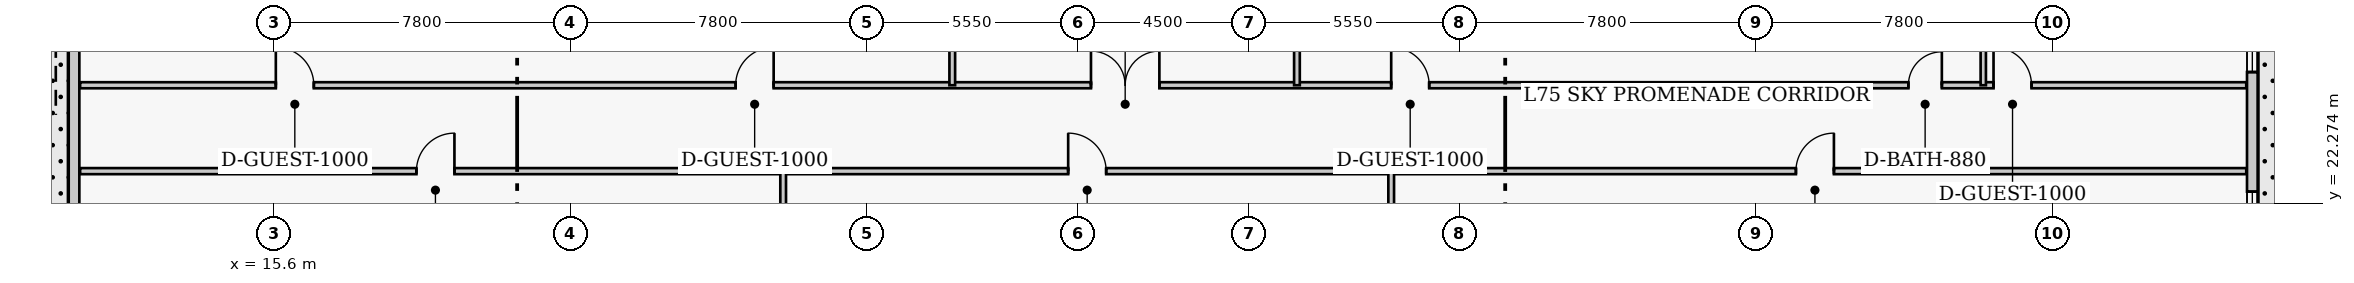
"""IFC4 building model, lengths in metres.
Left out: names, types, materials, properties, quantities, classifications, styles, units other than length and angle.
Written with IfcOpenShell. Run it as: python <this file> out.ifc"""

import sys

from ifc_helpers import new_model, si_unit, direction, frame, frame_2d, origin, place, context, subcontext, project, spatial, rectangle, extrude, element, fill, save


model = new_model("IFC4")
c1 = context("Model", 3, precision=1e-05, world=origin(), true_north=direction((0.0, 1.0)))
c2 = subcontext(c1, "Body", "Model", "MODEL_VIEW")
j1 = project(units=[si_unit("LENGTHUNIT", "METRE"), si_unit("PLANEANGLEUNIT", "RADIAN")], contexts=[c1])
p1 = place(None, origin())
s1 = spatial("IfcSite", under=j1, at=p1, CompositionType="ELEMENT")
p2 = place(p1, origin())
s2 = spatial("IfcBuilding", under=s1, at=p2, CompositionType="ELEMENT")
p3 = place(p2, frame((0.0, 0.0, 302.0)))
s3 = spatial("IfcBuildingStorey", under=s2, at=p3, CompositionType="ELEMENT", Elevation=302.0)
p4 = place(p3, frame((67.66, 15.26, 0.0), z_axis=(0.0, 0.0, 1.0), x_axis=(0.0, 1.0, 0.0)))
e1 = element("IfcWall", 1, at=p4, inside=s3, PredefinedType="SOLIDWALL", context=c2, shape_type="SweptSolid", body=[
    extrude(rectangle(XDim=26.68, YDim=0.28, at=frame_2d((13.34, 0.0))), origin(), (0.0, 0.0, 1.0), 4.31),
])
p5 = place(p4, frame((0.923, 0.0, 0.65)))
e2 = element("IfcOpeningElement", 2, at=p5, cuts=e1, PredefinedType="OPENING", context=c2, shape_type="SweptSolid", body=[
    extrude(rectangle(XDim=2.6, YDim=2.2, at=frame_2d((1.3, 1.1))), frame((0.0, 0.15, 0.0), z_axis=(0.0, -1.0, 0.0), x_axis=(1.0, 0.0, 0.0)), (0.0, 0.0, 1.0), 0.3),
])
p6 = place(p4, frame((4.72, 0.0, 0.65)))
e3 = element("IfcOpeningElement", 3, at=p6, cuts=e1, PredefinedType="OPENING", context=c2, shape_type="SweptSolid", body=[
    extrude(rectangle(XDim=2.6, YDim=2.2, at=frame_2d((1.3, 1.1))), frame((0.0, 0.15, 0.0), z_axis=(0.0, -1.0, 0.0), x_axis=(1.0, 0.0, 0.0)), (0.0, 0.0, 1.0), 0.3),
])
p7 = place(p4, frame((10.467, 0.0, 0.65)))
e4 = element("IfcOpeningElement", 4, at=p7, cuts=e1, PredefinedType="OPENING", context=c2, shape_type="SweptSolid", body=[
    extrude(rectangle(XDim=2.6, YDim=2.2, at=frame_2d((1.3, 1.1))), frame((0.0, 0.15, 0.0), z_axis=(0.0, -1.0, 0.0), x_axis=(1.0, 0.0, 0.0)), (0.0, 0.0, 1.0), 0.3),
])
p8 = place(p4, frame((14.263, 0.0, 0.65)))
e5 = element("IfcOpeningElement", 5, at=p8, cuts=e1, PredefinedType="OPENING", context=c2, shape_type="SweptSolid", body=[
    extrude(rectangle(XDim=2.6, YDim=2.2, at=frame_2d((1.3, 1.1))), frame((0.0, 0.15, 0.0), z_axis=(0.0, -1.0, 0.0), x_axis=(1.0, 0.0, 0.0)), (0.0, 0.0, 1.0), 0.3),
])
p9 = place(p4, frame((18.71, 0.0, 0.65)))
e6 = element("IfcOpeningElement", 6, at=p9, cuts=e1, PredefinedType="OPENING", context=c2, shape_type="SweptSolid", body=[
    extrude(rectangle(XDim=2.6, YDim=2.2, at=frame_2d((1.3, 1.1))), frame((0.0, 0.15, 0.0), z_axis=(0.0, -1.0, 0.0), x_axis=(1.0, 0.0, 0.0)), (0.0, 0.0, 1.0), 0.3),
])
p10 = place(p4, frame((23.157, 0.0, 0.65)))
e7 = element("IfcOpeningElement", 7, at=p10, cuts=e1, PredefinedType="OPENING", context=c2, shape_type="SweptSolid", body=[
    extrude(rectangle(XDim=2.6, YDim=2.2, at=frame_2d((1.3, 1.1))), frame((0.0, 0.15, 0.0), z_axis=(0.0, -1.0, 0.0), x_axis=(1.0, 0.0, 0.0)), (0.0, 0.0, 1.0), 0.3),
])
p11 = place(p3, frame((10.34, 38.94, 0.0), z_axis=(0.0, 0.0, 1.0), x_axis=(0.0, -1.0, 0.0)))
e8 = element("IfcWall", 8, at=p11, inside=s3, PredefinedType="SOLIDWALL", context=c2, shape_type="SweptSolid", body=[
    extrude(rectangle(XDim=26.68, YDim=0.28, at=frame_2d((13.34, 0.0))), origin(), (0.0, 0.0, 1.0), 4.31),
])
p12 = place(p11, frame((0.923, 0.0, 0.65)))
e9 = element("IfcOpeningElement", 9, at=p12, cuts=e8, PredefinedType="OPENING", context=c2, shape_type="SweptSolid", body=[
    extrude(rectangle(XDim=2.6, YDim=2.2, at=frame_2d((1.3, 1.1))), frame((0.0, 0.15, 0.0), z_axis=(0.0, -1.0, 0.0), x_axis=(1.0, 0.0, 0.0)), (0.0, 0.0, 1.0), 0.3),
])
p13 = place(p11, frame((5.37, 0.0, 0.65)))
e10 = element("IfcOpeningElement", 10, at=p13, cuts=e8, PredefinedType="OPENING", context=c2, shape_type="SweptSolid", body=[
    extrude(rectangle(XDim=2.6, YDim=2.2, at=frame_2d((1.3, 1.1))), frame((0.0, 0.15, 0.0), z_axis=(0.0, -1.0, 0.0), x_axis=(1.0, 0.0, 0.0)), (0.0, 0.0, 1.0), 0.3),
])
p14 = place(p11, frame((9.817, 0.0, 0.65)))
e11 = element("IfcOpeningElement", 11, at=p14, cuts=e8, PredefinedType="OPENING", context=c2, shape_type="SweptSolid", body=[
    extrude(rectangle(XDim=2.6, YDim=2.2, at=frame_2d((1.3, 1.1))), frame((0.0, 0.15, 0.0), z_axis=(0.0, -1.0, 0.0), x_axis=(1.0, 0.0, 0.0)), (0.0, 0.0, 1.0), 0.3),
])
p15 = place(p11, frame((18.71, 0.0, 0.65)))
e12 = element("IfcOpeningElement", 12, at=p15, cuts=e8, PredefinedType="OPENING", context=c2, shape_type="SweptSolid", body=[
    extrude(rectangle(XDim=2.6, YDim=2.2, at=frame_2d((1.3, 1.1))), frame((0.0, 0.15, 0.0), z_axis=(0.0, -1.0, 0.0), x_axis=(1.0, 0.0, 0.0)), (0.0, 0.0, 1.0), 0.3),
])
p16 = place(p11, frame((23.157, 0.0, 0.65)))
e13 = element("IfcOpeningElement", 13, at=p16, cuts=e8, PredefinedType="OPENING", context=c2, shape_type="SweptSolid", body=[
    extrude(rectangle(XDim=2.6, YDim=2.2, at=frame_2d((1.3, 1.1))), frame((0.0, 0.15, 0.0), z_axis=(0.0, -1.0, 0.0), x_axis=(1.0, 0.0, 0.0)), (0.0, 0.0, 1.0), 0.3),
])
p17 = place(p3, frame((10.5, 23.12, 0.0), z_axis=(0.0, 0.0, 1.0), x_axis=(1.0, 0.0, 0.0)))
e14 = element("IfcWall", 14, at=p17, inside=s3, PredefinedType="PARTITIONING", context=c2, shape_type="SweptSolid", body=[
    extrude(rectangle(XDim=57.0, YDim=0.16, at=frame_2d((28.5, 0.0))), origin(), (0.0, 0.0, 1.0), 4.31),
])
p18 = place(p17, frame((8.85, 0.0, 0.0)))
e15 = element("IfcOpeningElement", 15, at=p18, cuts=e14, PredefinedType="OPENING", context=c2, shape_type="SweptSolid", body=[
    extrude(rectangle(XDim=1.0, YDim=2.15, at=frame_2d((0.5, 1.075))), frame((0.0, 0.09, 0.0), z_axis=(0.0, -1.0, 0.0), x_axis=(1.0, 0.0, 0.0)), (0.0, 0.0, 1.0), 0.18),
])
p19 = place(p17, frame((26.0, 0.0, 0.0)))
e16 = element("IfcOpeningElement", 16, at=p19, cuts=e14, PredefinedType="OPENING", context=c2, shape_type="SweptSolid", body=[
    extrude(rectangle(XDim=1.0, YDim=2.15, at=frame_2d((0.5, 1.075))), frame((0.0, 0.09, 0.0), z_axis=(0.0, -1.0, 0.0), x_axis=(1.0, 0.0, 0.0)), (0.0, 0.0, 1.0), 0.18),
])
p20 = place(p17, frame((45.15, 0.0, 0.0)))
e17 = element("IfcOpeningElement", 17, at=p20, cuts=e14, PredefinedType="OPENING", context=c2, shape_type="SweptSolid", body=[
    extrude(rectangle(XDim=1.0, YDim=2.15, at=frame_2d((0.5, 1.075))), frame((0.0, 0.09, 0.0), z_axis=(0.0, -1.0, 0.0), x_axis=(1.0, 0.0, 0.0)), (0.0, 0.0, 1.0), 0.18),
])
p21 = place(p3, frame((10.5, 25.38, 0.0), z_axis=(0.0, 0.0, 1.0), x_axis=(1.0, 0.0, 0.0)))
e18 = element("IfcWall", 18, at=p21, inside=s3, PredefinedType="PARTITIONING", context=c2, shape_type="SweptSolid", body=[
    extrude(rectangle(XDim=57.0, YDim=0.16, at=frame_2d((28.5, 0.0))), origin(), (0.0, 0.0, 1.0), 4.31),
])
p22 = place(p21, frame((26.6, 0.0, 0.0)))
e19 = element("IfcOpeningElement", 19, at=p22, cuts=e18, PredefinedType="OPENING", context=c2, shape_type="SweptSolid", body=[
    extrude(rectangle(XDim=1.8, YDim=2.2, at=frame_2d((0.9, 1.1))), frame((0.0, 0.09, 0.0), z_axis=(0.0, -1.0, 0.0), x_axis=(1.0, 0.0, 0.0)), (0.0, 0.0, 1.0), 0.18),
])
p23 = place(p21, frame((17.25, 0.0, 0.0)))
e20 = element("IfcOpeningElement", 20, at=p23, cuts=e18, PredefinedType="OPENING", context=c2, shape_type="SweptSolid", body=[
    extrude(rectangle(XDim=1.0, YDim=2.15, at=frame_2d((0.5, 1.075))), frame((0.0, 0.09, 0.0), z_axis=(0.0, -1.0, 0.0), x_axis=(1.0, 0.0, 0.0)), (0.0, 0.0, 1.0), 0.18),
])
p24 = place(p21, frame((34.5, 0.0, 0.0)))
e21 = element("IfcOpeningElement", 21, at=p24, cuts=e18, PredefinedType="OPENING", context=c2, shape_type="SweptSolid", body=[
    extrude(rectangle(XDim=1.0, YDim=2.15, at=frame_2d((0.5, 1.075))), frame((0.0, 0.09, 0.0), z_axis=(0.0, -1.0, 0.0), x_axis=(1.0, 0.0, 0.0)), (0.0, 0.0, 1.0), 0.18),
])
p25 = place(p21, frame((5.15, 0.0, 0.0)))
e22 = element("IfcOpeningElement", 22, at=p25, cuts=e18, PredefinedType="OPENING", context=c2, shape_type="SweptSolid", body=[
    extrude(rectangle(XDim=1.0, YDim=2.15, at=frame_2d((0.5, 1.075))), frame((0.0, 0.09, 0.0), z_axis=(0.0, -1.0, 0.0), x_axis=(1.0, 0.0, 0.0)), (0.0, 0.0, 1.0), 0.18),
])
p26 = place(p21, frame((48.11, 0.0, 0.0)))
e23 = element("IfcOpeningElement", 23, at=p26, cuts=e18, PredefinedType="OPENING", context=c2, shape_type="SweptSolid", body=[
    extrude(rectangle(XDim=0.88, YDim=2.05, at=frame_2d((0.44, 1.025))), frame((0.0, 0.09, 0.0), z_axis=(0.0, -1.0, 0.0), x_axis=(1.0, 0.0, 0.0)), (0.0, 0.0, 1.0), 0.18),
])
p27 = place(p21, frame((50.35, 0.0, 0.0)))
e24 = element("IfcOpeningElement", 24, at=p27, cuts=e18, PredefinedType="OPENING", context=c2, shape_type="SweptSolid", body=[
    extrude(rectangle(XDim=1.0, YDim=2.15, at=frame_2d((0.5, 1.075))), frame((0.0, 0.09, 0.0), z_axis=(0.0, -1.0, 0.0), x_axis=(1.0, 0.0, 0.0)), (0.0, 0.0, 1.0), 0.18),
])
for number, where, z_axis, x_axis in (
    (25, (33.45, 25.38, 0.0), (0.0, 0.0, 1.0), (0.0, 1.0, 0.0)),
    (26, (42.52, 25.38, 0.0), (0.0, 0.0, 1.0), (0.0, 1.0, 0.0)),
):
    element("IfcWall", number, at=place(p3, frame(where, z_axis=z_axis, x_axis=x_axis)), inside=s3, PredefinedType="PARTITIONING", context=c2, shape_type="SweptSolid", body=[
        extrude(rectangle(XDim=4.17, YDim=0.15, at=frame_2d((2.085, 0.0))), origin(), (0.0, 0.0, 1.0), 4.31),
    ])
p28 = place(p3, frame((29.0, 8.3, 0.0), z_axis=(0.0, 0.0, 1.0), x_axis=(0.0, 1.0, 0.0)))
e27 = element("IfcWall", 27, at=p28, inside=s3, PredefinedType="PARTITIONING", context=c2, shape_type="SweptSolid", body=[
    extrude(rectangle(XDim=14.82, YDim=0.15, at=frame_2d((7.41, 0.0))), origin(), (0.0, 0.0, 1.0), 4.31),
])
p29 = place(p3, frame((45.0, 9.82, 0.0), z_axis=(0.0, 0.0, 1.0), x_axis=(0.0, 1.0, 0.0)))
e28 = element("IfcWall", 28, at=p29, inside=s3, PredefinedType="PARTITIONING", context=c2, shape_type="SweptSolid", body=[
    extrude(rectangle(XDim=13.3, YDim=0.15, at=frame_2d((6.65, 0.0))), origin(), (0.0, 0.0, 1.0), 4.31),
])
p30 = place(p3, frame((60.58, 25.38, 0.0), z_axis=(0.0, 0.0, 1.0), x_axis=(0.0, 1.0, 0.0)))
e29 = element("IfcWall", 29, at=p30, inside=s3, PredefinedType="PLUMBINGWALL", context=c2, shape_type="SweptSolid", body=[
    extrude(rectangle(XDim=7.32, YDim=0.14, at=frame_2d((3.66, 0.0))), origin(), (0.0, 0.0, 1.0), 4.31),
])
p31 = place(p6, origin())
e30 = element("IfcWindow", 30, at=p31, inside=s3, PartitioningType="SINGLE_PANEL", PredefinedType="WINDOW", context=c2, shape_type="SweptSolid", body=[
    extrude(rectangle(XDim=2.6, YDim=2.2, at=frame_2d((1.3, 1.1))), frame((0.0, 0.03, 0.0), z_axis=(0.0, -1.0, 0.0), x_axis=(1.0, 0.0, 0.0)), (0.0, 0.0, 1.0), 0.06),
])
fill(e3, e30)
p32 = place(p7, origin())
e31 = element("IfcWindow", 31, at=p32, inside=s3, PartitioningType="SINGLE_PANEL", PredefinedType="WINDOW", context=c2, shape_type="SweptSolid", body=[
    extrude(rectangle(XDim=2.6, YDim=2.2, at=frame_2d((1.3, 1.1))), frame((0.0, 0.03, 0.0), z_axis=(0.0, -1.0, 0.0), x_axis=(1.0, 0.0, 0.0)), (0.0, 0.0, 1.0), 0.06),
])
fill(e4, e31)
p33 = place(p22, origin())
e32 = element("IfcDoor", 32, at=p33, inside=s3, OperationType="DOUBLE_DOOR_SINGLE_SWING", PredefinedType="DOOR", context=c2, shape_type="SweptSolid", body=[
    extrude(rectangle(XDim=1.8, YDim=2.2, at=frame_2d((0.9, 1.1))), frame((0.0, 0.025, 0.0), z_axis=(0.0, -1.0, 0.0), x_axis=(1.0, 0.0, 0.0)), (0.0, 0.0, 1.0), 0.05),
])
fill(e19, e32)
p34 = place(p23, origin())
e33 = element("IfcDoor", 33, at=p34, inside=s3, OperationType="SINGLE_SWING_RIGHT", PredefinedType="DOOR", context=c2, shape_type="SweptSolid", body=[
    extrude(rectangle(XDim=1.0, YDim=2.15, at=frame_2d((0.5, 1.075))), frame((0.0, 0.025, 0.0), z_axis=(0.0, -1.0, 0.0), x_axis=(1.0, 0.0, 0.0)), (0.0, 0.0, 1.0), 0.05),
])
fill(e20, e33)
p35 = place(p24, origin())
e34 = element("IfcDoor", 34, at=p35, inside=s3, OperationType="SINGLE_SWING_LEFT", PredefinedType="DOOR", context=c2, shape_type="SweptSolid", body=[
    extrude(rectangle(XDim=1.0, YDim=2.15, at=frame_2d((0.5, 1.075))), frame((0.0, 0.025, 0.0), z_axis=(0.0, -1.0, 0.0), x_axis=(1.0, 0.0, 0.0)), (0.0, 0.0, 1.0), 0.05),
])
fill(e21, e34)
p36 = place(p18, origin())
e35 = element("IfcDoor", 35, at=p36, inside=s3, OperationType="SINGLE_SWING_RIGHT", PredefinedType="DOOR", context=c2, shape_type="SweptSolid", body=[
    extrude(rectangle(XDim=1.0, YDim=2.15, at=frame_2d((0.5, 1.075))), frame((0.0, 0.025, 0.0), z_axis=(0.0, -1.0, 0.0), x_axis=(1.0, 0.0, 0.0)), (0.0, 0.0, 1.0), 0.05),
])
fill(e15, e35)
p37 = place(p19, origin())
e36 = element("IfcDoor", 36, at=p37, inside=s3, OperationType="SINGLE_SWING_LEFT", PredefinedType="DOOR", context=c2, shape_type="SweptSolid", body=[
    extrude(rectangle(XDim=1.0, YDim=2.15, at=frame_2d((0.5, 1.075))), frame((0.0, 0.025, 0.0), z_axis=(0.0, -1.0, 0.0), x_axis=(1.0, 0.0, 0.0)), (0.0, 0.0, 1.0), 0.05),
])
fill(e16, e36)
p38 = place(p20, origin())
e37 = element("IfcDoor", 37, at=p38, inside=s3, OperationType="SINGLE_SWING_RIGHT", PredefinedType="DOOR", context=c2, shape_type="SweptSolid", body=[
    extrude(rectangle(XDim=1.0, YDim=2.15, at=frame_2d((0.5, 1.075))), frame((0.0, 0.025, 0.0), z_axis=(0.0, -1.0, 0.0), x_axis=(1.0, 0.0, 0.0)), (0.0, 0.0, 1.0), 0.05),
])
fill(e17, e37)
p39 = place(p25, origin())
e38 = element("IfcDoor", 38, at=p39, inside=s3, OperationType="SINGLE_SWING_LEFT", PredefinedType="DOOR", context=c2, shape_type="SweptSolid", body=[
    extrude(rectangle(XDim=1.0, YDim=2.15, at=frame_2d((0.5, 1.075))), frame((0.0, 0.025, 0.0), z_axis=(0.0, -1.0, 0.0), x_axis=(1.0, 0.0, 0.0)), (0.0, 0.0, 1.0), 0.05),
])
fill(e22, e38)
p40 = place(p26, origin())
e39 = element("IfcDoor", 39, at=p40, inside=s3, OperationType="SINGLE_SWING_RIGHT", PredefinedType="DOOR", context=c2, shape_type="SweptSolid", body=[
    extrude(rectangle(XDim=0.88, YDim=2.05, at=frame_2d((0.44, 1.025))), frame((0.0, 0.025, 0.0), z_axis=(0.0, -1.0, 0.0), x_axis=(1.0, 0.0, 0.0)), (0.0, 0.0, 1.0), 0.05),
])
fill(e23, e39)
p41 = place(p27, origin())
e40 = element("IfcDoor", 40, at=p41, inside=s3, OperationType="SINGLE_SWING_LEFT", PredefinedType="DOOR", context=c2, shape_type="SweptSolid", body=[
    extrude(rectangle(XDim=1.0, YDim=2.15, at=frame_2d((0.5, 1.075))), frame((0.0, 0.025, 0.0), z_axis=(0.0, -1.0, 0.0), x_axis=(1.0, 0.0, 0.0)), (0.0, 0.0, 1.0), 0.05),
])
fill(e24, e40)
save(model, sys.argv[1])
